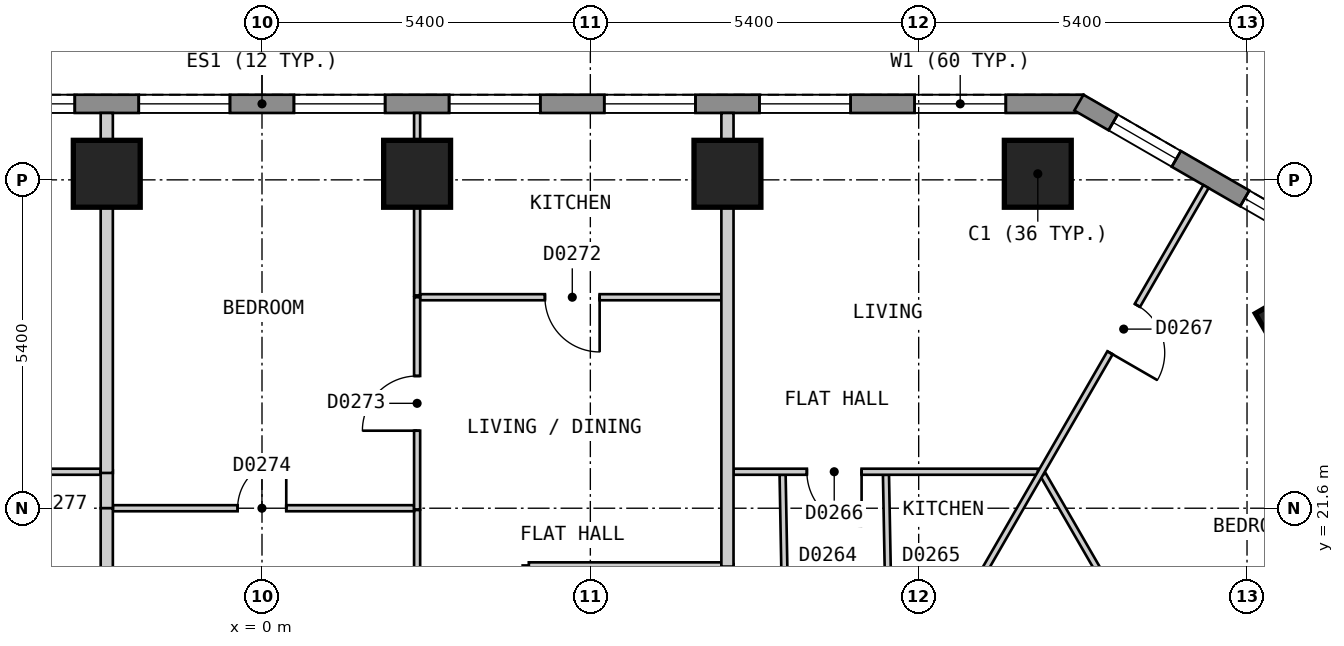
"""IFC4 building model, lengths in metres.
Left out: names, types, materials, properties, quantities, classifications, styles, units other than length and angle.
Written with IfcOpenShell. Run it as: python <this file> out.ifc"""

import sys

from ifc_helpers import new_model, si_unit, direction, frame, frame_2d, origin, origin_2d, place, context, subcontext, project, spatial, polyline, rectangle, outline, extrude, element, fill, save


model = new_model("IFC4")
c1 = context("Model", 3, precision=1e-05, world=origin(), true_north=direction((0.0, 1.0)))
c2 = subcontext(c1, "Body", "Model", "MODEL_VIEW")
j1 = project(units=[si_unit("LENGTHUNIT", "METRE"), si_unit("PLANEANGLEUNIT", "RADIAN")], contexts=[c1])
p1 = place(None, origin())
s1 = spatial("IfcSite", under=j1, at=p1, CompositionType="ELEMENT")
p2 = place(p1, origin())
s2 = spatial("IfcBuilding", under=s1, at=p2, CompositionType="ELEMENT")
p3 = place(p2, frame((0.0, 0.0, 41.4)))
s3 = spatial("IfcBuildingStorey", under=s2, at=p3, CompositionType="ELEMENT", Elevation=41.4)
for number, where, z_axis, x_axis in (
    (1, (12.759, 27.1, 0.0), (0.0, 0.0, 1.0), (-1.0, 0.0, 0.0)),
    (2, (7.655, 27.1, 0.0), (0.0, 0.0, 1.0), (-1.0, 0.0, 0.0)),
    (3, (2.551, 27.1, 0.0), (0.0, 0.0, 1.0), (-1.0, 0.0, 0.0)),
    (4, (-2.553, 27.1, 0.0), (0.0, 0.0, 1.0), (-1.0, 0.0, 0.0)),
    (5, (17.089, 24.601, 0.0), (0.0, 0.0, 1.0), (-0.5, 0.866, 0.0)),
):
    element("IfcColumn", number, at=place(p3, frame(where, z_axis=z_axis, x_axis=x_axis)), inside=s3, PredefinedType="COLUMN", context=c2, shape_type="SweptSolid", body=[
        extrude(rectangle(XDim=1.1, YDim=1.1, at=origin_2d()), origin(), (0.0, 0.0, 1.0), 3.0),
    ])
p4 = place(p3, frame((13.51, 28.25, 0.0), z_axis=(0.0, 0.0, 1.0), x_axis=(-1.0, 0.0, 0.0)))
e6 = element("IfcWall", 6, at=p4, inside=s3, PredefinedType="SOLIDWALL", context=c2, shape_type="SweptSolid", body=[
    extrude(outline(polyline([(0.0, -0.15), (27.02, -0.15), (26.94, 0.15), (0.08, 0.15), (0.0, -0.15)])), origin(), (0.0, 0.0, 1.0), 2.7),
])
p5 = place(p4, frame((1.277, 0.0, 0.15)))
e7 = element("IfcOpeningElement", 7, at=p5, cuts=e6, PredefinedType="OPENING", context=c2, shape_type="SweptSolid", body=[
    extrude(rectangle(XDim=1.5, YDim=2.1, at=frame_2d((0.75, 1.05))), frame((0.0, 0.16, 0.0), z_axis=(0.0, -1.0, 0.0), x_axis=(1.0, 0.0, 0.0)), (0.0, 0.0, 1.0), 0.32),
])
p6 = place(p4, frame((3.829, 0.0, 0.15)))
e8 = element("IfcOpeningElement", 8, at=p6, cuts=e6, PredefinedType="OPENING", context=c2, shape_type="SweptSolid", body=[
    extrude(rectangle(XDim=1.5, YDim=2.1, at=frame_2d((0.75, 1.05))), frame((0.0, 0.16, 0.0), z_axis=(0.0, -1.0, 0.0), x_axis=(1.0, 0.0, 0.0)), (0.0, 0.0, 1.0), 0.32),
])
p7 = place(p4, frame((6.381, 0.0, 0.15)))
e9 = element("IfcOpeningElement", 9, at=p7, cuts=e6, PredefinedType="OPENING", context=c2, shape_type="SweptSolid", body=[
    extrude(rectangle(XDim=1.5, YDim=2.1, at=frame_2d((0.75, 1.05))), frame((0.0, 0.16, 0.0), z_axis=(0.0, -1.0, 0.0), x_axis=(1.0, 0.0, 0.0)), (0.0, 0.0, 1.0), 0.32),
])
p8 = place(p4, frame((8.933, 0.0, 0.15)))
e10 = element("IfcOpeningElement", 10, at=p8, cuts=e6, PredefinedType="OPENING", context=c2, shape_type="SweptSolid", body=[
    extrude(rectangle(XDim=1.5, YDim=2.1, at=frame_2d((0.75, 1.05))), frame((0.0, 0.16, 0.0), z_axis=(0.0, -1.0, 0.0), x_axis=(1.0, 0.0, 0.0)), (0.0, 0.0, 1.0), 0.32),
])
p9 = place(p4, frame((11.485, 0.0, 0.15)))
e11 = element("IfcOpeningElement", 11, at=p9, cuts=e6, PredefinedType="OPENING", context=c2, shape_type="SweptSolid", body=[
    extrude(rectangle(XDim=1.5, YDim=2.1, at=frame_2d((0.75, 1.05))), frame((0.0, 0.16, 0.0), z_axis=(0.0, -1.0, 0.0), x_axis=(1.0, 0.0, 0.0)), (0.0, 0.0, 1.0), 0.32),
])
p10 = place(p4, frame((14.037, 0.0, 0.15)))
e12 = element("IfcOpeningElement", 12, at=p10, cuts=e6, PredefinedType="OPENING", context=c2, shape_type="SweptSolid", body=[
    extrude(rectangle(XDim=1.5, YDim=2.1, at=frame_2d((0.75, 1.05))), frame((0.0, 0.16, 0.0), z_axis=(0.0, -1.0, 0.0), x_axis=(1.0, 0.0, 0.0)), (0.0, 0.0, 1.0), 0.32),
])
p11 = place(p4, frame((16.589, 0.0, 0.15)))
e13 = element("IfcOpeningElement", 13, at=p11, cuts=e6, PredefinedType="OPENING", context=c2, shape_type="SweptSolid", body=[
    extrude(rectangle(XDim=1.5, YDim=2.1, at=frame_2d((0.75, 1.05))), frame((0.0, 0.16, 0.0), z_axis=(0.0, -1.0, 0.0), x_axis=(1.0, 0.0, 0.0)), (0.0, 0.0, 1.0), 0.32),
])
p12 = place(p4, frame((19.141, 0.0, 0.15)))
e14 = element("IfcOpeningElement", 14, at=p12, cuts=e6, PredefinedType="OPENING", context=c2, shape_type="SweptSolid", body=[
    extrude(rectangle(XDim=1.5, YDim=2.1, at=frame_2d((0.75, 1.05))), frame((0.0, 0.16, 0.0), z_axis=(0.0, -1.0, 0.0), x_axis=(1.0, 0.0, 0.0)), (0.0, 0.0, 1.0), 0.32),
])
p13 = place(p4, frame((21.693, 0.0, 0.15)))
e15 = element("IfcOpeningElement", 15, at=p13, cuts=e6, PredefinedType="OPENING", context=c2, shape_type="SweptSolid", body=[
    extrude(rectangle(XDim=1.5, YDim=2.1, at=frame_2d((0.75, 1.05))), frame((0.0, 0.16, 0.0), z_axis=(0.0, -1.0, 0.0), x_axis=(1.0, 0.0, 0.0)), (0.0, 0.0, 1.0), 0.32),
])
p14 = place(p4, frame((24.245, 0.0, 0.15)))
e16 = element("IfcOpeningElement", 16, at=p14, cuts=e6, PredefinedType="OPENING", context=c2, shape_type="SweptSolid", body=[
    extrude(rectangle(XDim=1.5, YDim=2.1, at=frame_2d((0.75, 1.05))), frame((0.0, 0.16, 0.0), z_axis=(0.0, -1.0, 0.0), x_axis=(1.0, 0.0, 0.0)), (0.0, 0.0, 1.0), 0.32),
])
p15 = place(p3, frame((17.765, 25.77, 0.0), z_axis=(0.0, 0.0, 1.0), x_axis=(-0.866010750942, 0.50002537861, 0.0)))
e17 = element("IfcWall", 17, at=p15, inside=s3, PredefinedType="SOLIDWALL", context=c2, shape_type="SweptSolid", body=[
    extrude(outline(polyline([(0.0, -0.15), (5.0, -0.15), (4.919, 0.15), (0.08, 0.15), (0.0, -0.15)])), origin(), (0.0, 0.0, 1.0), 2.7),
])
p16 = place(p15, frame((0.65, 0.0, 0.15)))
e18 = element("IfcOpeningElement", 18, at=p16, cuts=e17, PredefinedType="OPENING", context=c2, shape_type="SweptSolid", body=[
    extrude(rectangle(XDim=1.2, YDim=2.1, at=frame_2d((0.6, 1.05))), frame((0.0, 0.16, 0.0), z_axis=(0.0, -1.0, 0.0), x_axis=(1.0, 0.0, 0.0)), (0.0, 0.0, 1.0), 0.32),
])
p17 = place(p15, frame((3.15, 0.0, 0.15)))
e19 = element("IfcOpeningElement", 19, at=p17, cuts=e17, PredefinedType="OPENING", context=c2, shape_type="SweptSolid", body=[
    extrude(rectangle(XDim=1.2, YDim=2.1, at=frame_2d((0.6, 1.05))), frame((0.0, 0.16, 0.0), z_axis=(0.0, -1.0, 0.0), x_axis=(1.0, 0.0, 0.0)), (0.0, 0.0, 1.0), 0.32),
])
p18 = place(p3, frame((12.846, 22.15, 0.0), z_axis=(0.0, 0.0, 1.0), x_axis=(0.500002715276, -0.866023836113, 0.0)))
e20 = element("IfcWall", 20, at=p18, inside=s3, PredefinedType="PARTITIONING", context=c2, shape_type="SweptSolid", body=[
    extrude(rectangle(XDim=5.002, YDim=0.1, at=frame_2d((2.501, 0.0))), origin(), (0.0, 0.0, 1.0), 2.7),
])
p19 = place(p18, frame((2.122, 0.0, 0.0)))
e21 = element("IfcOpeningElement", 21, at=p19, cuts=e20, PredefinedType="OPENING", context=c2, shape_type="SweptSolid", body=[
    extrude(rectangle(XDim=0.8, YDim=2.1, at=frame_2d((0.4, 1.05))), frame((0.0, 0.06, 0.0), z_axis=(0.0, -1.0, 0.0), x_axis=(1.0, 0.0, 0.0)), (0.0, 0.0, 1.0), 0.12),
])
p20 = place(p3, frame((8.562, 22.15, 0.0), z_axis=(0.0, 0.0, 1.0), x_axis=(0.018504185939, -0.999828782894, 0.0)))
e22 = element("IfcWall", 22, at=p20, inside=s3, PredefinedType="PARTITIONING", context=c2, shape_type="SweptSolid", body=[
    extrude(rectangle(XDim=4.051, YDim=0.1, at=frame_2d((2.025, 0.0))), origin(), (0.0, 0.0, 1.0), 2.7),
])
p21 = place(p20, frame((1.65, 0.0, 0.0)))
e23 = element("IfcOpeningElement", 23, at=p21, cuts=e22, PredefinedType="OPENING", context=c2, shape_type="SweptSolid", body=[
    extrude(rectangle(XDim=0.8, YDim=2.1, at=frame_2d((0.4, 1.05))), frame((0.0, 0.06, 0.0), z_axis=(0.0, -1.0, 0.0), x_axis=(1.0, 0.0, 0.0)), (0.0, 0.0, 1.0), 0.12),
])
p22 = place(p3, frame((10.262, 22.15, 0.0), z_axis=(0.0, 0.0, 1.0), x_axis=(0.018730524712, -0.999824568334, 0.0)))
e24 = element("IfcWall", 24, at=p22, inside=s3, PredefinedType="PARTITIONING", context=c2, shape_type="SweptSolid", body=[
    extrude(rectangle(XDim=4.054, YDim=0.1, at=frame_2d((2.027, 0.0))), origin(), (0.0, 0.0, 1.0), 2.7),
])
p23 = place(p22, frame((1.6, 0.0, 0.0)))
e25 = element("IfcOpeningElement", 25, at=p23, cuts=e24, PredefinedType="OPENING", context=c2, shape_type="SweptSolid", body=[
    extrude(rectangle(XDim=0.9, YDim=2.1, at=frame_2d((0.45, 1.05))), frame((0.0, 0.06, 0.0), z_axis=(0.0, -1.0, 0.0), x_axis=(1.0, 0.0, 0.0)), (0.0, 0.0, 1.0), 0.12),
])
p24 = place(p3, frame((2.551, 28.1, 0.0), z_axis=(0.0, 0.0, 1.0), x_axis=(0.0, -1.0, 0.0)))
e26 = element("IfcWall", 26, at=p24, inside=s3, PredefinedType="PARTITIONING", context=c2, shape_type="SweptSolid", body=[
    extrude(rectangle(XDim=3.0, YDim=0.1, at=frame_2d((1.5, 0.0))), origin(), (0.0, 0.0, 1.0), 2.7),
])
p25 = place(p3, frame((2.551, 21.57, 0.0), z_axis=(0.0, 0.0, 1.0), x_axis=(0.0, -1.0, 0.0)))
e27 = element("IfcWall", 27, at=p25, inside=s3, PredefinedType="PARTITIONING", context=c2, shape_type="SweptSolid", body=[
    extrude(rectangle(XDim=3.47, YDim=0.1, at=frame_2d((1.735, 0.0))), origin(), (0.0, 0.0, 1.0), 2.7),
])
p26 = place(p3, frame((4.388, 20.66, 0.0), z_axis=(0.0, 0.0, 1.0), x_axis=(1.0, 0.0, 0.0)))
e28 = element("IfcWall", 28, at=p26, inside=s3, PredefinedType="PARTITIONING", context=c2, shape_type="SweptSolid", body=[
    extrude(rectangle(XDim=3.167, YDim=0.1, at=frame_2d((1.583, 0.0))), origin(), (0.0, 0.0, 1.0), 2.7),
])
p27 = place(p3, frame((-2.453, 21.6, 0.0), z_axis=(0.0, 0.0, 1.0), x_axis=(1.0, 0.0, 0.0)))
e29 = element("IfcWall", 29, at=p27, inside=s3, PredefinedType="PARTITIONING", context=c2, shape_type="SweptSolid", body=[
    extrude(rectangle(XDim=4.954, YDim=0.1, at=frame_2d((2.477, 0.0))), origin(), (0.0, 0.0, 1.0), 2.7),
])
p28 = place(p27, frame((2.052, 0.0, 0.0)))
e30 = element("IfcOpeningElement", 30, at=p28, cuts=e29, PredefinedType="OPENING", context=c2, shape_type="SweptSolid", body=[
    extrude(rectangle(XDim=0.8, YDim=2.1, at=frame_2d((0.4, 1.05))), frame((0.0, 0.06, 0.0), z_axis=(0.0, -1.0, 0.0), x_axis=(1.0, 0.0, 0.0)), (0.0, 0.0, 1.0), 0.12),
])
p29 = place(p3, frame((-12.711, 22.2, 0.0), z_axis=(0.0, 0.0, 1.0), x_axis=(1.0, 0.0, 0.0)))
e31 = element("IfcWall", 31, at=p29, inside=s3, PredefinedType="PARTITIONING", context=c2, shape_type="SweptSolid", body=[
    extrude(rectangle(XDim=10.058, YDim=0.1, at=frame_2d((5.029, 0.0))), origin(), (0.0, 0.0, 1.0), 2.7),
])
p30 = place(p29, frame((7.156, 0.0, 0.0)))
e32 = element("IfcOpeningElement", 32, at=p30, cuts=e31, PredefinedType="OPENING", context=c2, shape_type="SweptSolid", body=[
    extrude(rectangle(XDim=0.9, YDim=2.1, at=frame_2d((0.45, 1.05))), frame((0.0, 0.06, 0.0), z_axis=(0.0, -1.0, 0.0), x_axis=(1.0, 0.0, 0.0)), (0.0, 0.0, 1.0), 0.12),
])
p31 = place(p29, frame((2.102, 0.0, 0.0)))
e33 = element("IfcOpeningElement", 33, at=p31, cuts=e31, PredefinedType="OPENING", context=c2, shape_type="SweptSolid", body=[
    extrude(rectangle(XDim=0.8, YDim=2.1, at=frame_2d((0.4, 1.05))), frame((0.0, 0.06, 0.0), z_axis=(0.0, -1.0, 0.0), x_axis=(1.0, 0.0, 0.0)), (0.0, 0.0, 1.0), 0.12),
])
p32 = place(p3, frame((7.755, 22.2, 0.0), z_axis=(0.0, 0.0, 1.0), x_axis=(1.0, 0.0, 0.0)))
e34 = element("IfcWall", 34, at=p32, inside=s3, PredefinedType="PARTITIONING", context=c2, shape_type="SweptSolid", body=[
    extrude(rectangle(XDim=5.005, YDim=0.1, at=frame_2d((2.502, 0.0))), origin(), (0.0, 0.0, 1.0), 2.7),
])
p33 = place(p32, frame((1.206, 0.0, 0.0)))
e35 = element("IfcOpeningElement", 35, at=p33, cuts=e34, PredefinedType="OPENING", context=c2, shape_type="SweptSolid", body=[
    extrude(rectangle(XDim=0.9, YDim=2.1, at=frame_2d((0.45, 1.05))), frame((0.0, 0.06, 0.0), z_axis=(0.0, -1.0, 0.0), x_axis=(1.0, 0.0, 0.0)), (0.0, 0.0, 1.0), 0.12),
])
p34 = place(p3, frame((2.601, 25.07, 0.0), z_axis=(0.0, 0.0, 1.0), x_axis=(1.0, 0.0, 0.0)))
e36 = element("IfcWall", 36, at=p34, inside=s3, PredefinedType="PARTITIONING", context=c2, shape_type="SweptSolid", body=[
    extrude(rectangle(XDim=4.954, YDim=0.1, at=frame_2d((2.477, 0.0))), origin(), (0.0, 0.0, 1.0), 2.7),
])
p35 = place(p34, frame((2.052, 0.0, 0.0)))
e37 = element("IfcOpeningElement", 37, at=p35, cuts=e36, PredefinedType="OPENING", context=c2, shape_type="SweptSolid", body=[
    extrude(rectangle(XDim=0.9, YDim=2.1, at=frame_2d((0.45, 1.05))), frame((0.0, 0.06, 0.0), z_axis=(0.0, -1.0, 0.0), x_axis=(1.0, 0.0, 0.0)), (0.0, 0.0, 1.0), 0.12),
])
p36 = place(p3, frame((10.393, 18.0, 0.0), z_axis=(0.0, 0.0, 1.0), x_axis=(0.499945497007, 0.866056868816, 0.0)))
e38 = element("IfcWall", 38, at=p36, inside=s3, PredefinedType="PARTITIONING", context=c2, shape_type="SweptSolid", body=[
    extrude(rectangle(XDim=10.265, YDim=0.1, at=frame_2d((5.132, 0.0))), origin(), (0.0, 0.0, 1.0), 2.7),
])
p37 = place(p36, frame((7.108, 0.0, 0.0)))
e39 = element("IfcOpeningElement", 39, at=p37, cuts=e38, PredefinedType="OPENING", context=c2, shape_type="SweptSolid", body=[
    extrude(rectangle(XDim=0.9, YDim=2.1, at=frame_2d((0.45, 1.05))), frame((0.0, 0.06, 0.0), z_axis=(0.0, -1.0, 0.0), x_axis=(1.0, 0.0, 0.0)), (0.0, 0.0, 1.0), 0.12),
])
p38 = place(p3, frame((4.337, 18.1, 0.0), z_axis=(0.0, 0.0, 1.0), x_axis=(0.0, 1.0, 0.0)))
e40 = element("IfcWall", 40, at=p38, inside=s3, PredefinedType="PARTITIONING", context=c2, shape_type="SweptSolid", body=[
    extrude(rectangle(XDim=2.559, YDim=0.1, at=frame_2d((1.279, 0.0))), origin(), (0.0, 0.0, 1.0), 2.7),
])
p39 = place(p38, frame((0.78, 0.0, 0.0)))
e41 = element("IfcOpeningElement", 41, at=p39, cuts=e40, PredefinedType="OPENING", context=c2, shape_type="SweptSolid", body=[
    extrude(rectangle(XDim=0.9, YDim=2.1, at=frame_2d((0.45, 1.05))), frame((0.0, 0.06, 0.0), z_axis=(0.0, -1.0, 0.0), x_axis=(1.0, 0.0, 0.0)), (0.0, 0.0, 1.0), 0.12),
])
p40 = place(p3, frame((2.551, 21.58, 0.0), z_axis=(0.0, 0.0, 1.0), x_axis=(0.0, 1.0, 0.0)))
e42 = element("IfcWall", 42, at=p40, inside=s3, PredefinedType="PARTITIONING", context=c2, shape_type="SweptSolid", body=[
    extrude(rectangle(XDim=3.49, YDim=0.1, at=frame_2d((1.745, 0.0))), origin(), (0.0, 0.0, 1.0), 2.7),
])
p41 = place(p40, frame((1.295, 0.0, 0.0)))
e43 = element("IfcOpeningElement", 43, at=p41, cuts=e42, PredefinedType="OPENING", context=c2, shape_type="SweptSolid", body=[
    extrude(rectangle(XDim=0.9, YDim=2.1, at=frame_2d((0.45, 1.05))), frame((0.0, 0.06, 0.0), z_axis=(0.0, -1.0, 0.0), x_axis=(1.0, 0.0, 0.0)), (0.0, 0.0, 1.0), 0.12),
])
p42 = place(p3, frame((-2.553, 22.22, 0.0), z_axis=(0.0, 0.0, 1.0), x_axis=(0.0, -1.0, 0.0)))
e44 = element("IfcWall", 44, at=p42, inside=s3, PredefinedType="PARTITIONING", context=c2, shape_type="SweptSolid", body=[
    extrude(rectangle(XDim=0.62, YDim=0.2, at=frame_2d((0.31, 0.0))), origin(), (0.0, 0.0, 1.0), 2.7),
])
p43 = place(p3, frame((7.655, 20.68, 0.0), z_axis=(0.0, 0.0, 1.0), x_axis=(0.0, -1.0, 0.0)))
e45 = element("IfcWall", 45, at=p43, inside=s3, PredefinedType="PARTITIONING", context=c2, shape_type="SweptSolid", body=[
    extrude(rectangle(XDim=2.58, YDim=0.2, at=frame_2d((1.29, 0.0))), origin(), (0.0, 0.0, 1.0), 2.7),
])
p44 = place(p3, frame((7.655, 20.64, 0.0), z_axis=(0.0, 0.0, 1.0), x_axis=(0.0, 1.0, 0.0)))
e46 = element("IfcWall", 46, at=p44, inside=s3, PredefinedType="PARTITIONING", context=c2, shape_type="SweptSolid", body=[
    extrude(rectangle(XDim=7.46, YDim=0.2, at=frame_2d((3.73, 0.0))), origin(), (0.0, 0.0, 1.0), 2.7),
])
p45 = place(p3, frame((-2.553, 18.1, 0.0), z_axis=(0.0, 0.0, 1.0), x_axis=(0.0, 1.0, 0.0)))
e47 = element("IfcWall", 47, at=p45, inside=s3, PredefinedType="PARTITIONING", context=c2, shape_type="SweptSolid", body=[
    extrude(rectangle(XDim=3.5, YDim=0.2, at=frame_2d((1.75, 0.0))), origin(), (0.0, 0.0, 1.0), 2.7),
])
p46 = place(p3, frame((-2.553, 22.18, 0.0), z_axis=(0.0, 0.0, 1.0), x_axis=(0.0, 1.0, 0.0)))
e48 = element("IfcWall", 48, at=p46, inside=s3, PredefinedType="PARTITIONING", context=c2, shape_type="SweptSolid", body=[
    extrude(rectangle(XDim=5.92, YDim=0.2, at=frame_2d((2.96, 0.0))), origin(), (0.0, 0.0, 1.0), 2.7),
])
p47 = place(p3, frame((11.847, 15.681, 0.0), z_axis=(0.0, 0.0, 1.0), x_axis=(0.866022959057, 0.500004234368, 0.0)))
e49 = element("IfcWall", 49, at=p47, inside=s3, PredefinedType="PARTITIONING", context=c2, shape_type="SweptSolid", body=[
    extrude(rectangle(XDim=10.0, YDim=0.2, at=frame_2d((5.0, 0.0))), origin(), (0.0, 0.0, 1.0), 2.7),
])
p48 = place(p5, origin())
e50 = element("IfcWindow", 50, at=p48, inside=s3, PartitioningType="SINGLE_PANEL", PredefinedType="WINDOW", context=c2, shape_type="SweptSolid", body=[
    extrude(rectangle(XDim=1.5, YDim=2.1, at=frame_2d((0.75, 1.05))), frame((0.0, 0.03, 0.0), z_axis=(0.0, -1.0, 0.0), x_axis=(1.0, 0.0, 0.0)), (0.0, 0.0, 1.0), 0.06),
])
fill(e7, e50)
p49 = place(p6, origin())
e51 = element("IfcWindow", 51, at=p49, inside=s3, PartitioningType="SINGLE_PANEL", PredefinedType="WINDOW", context=c2, shape_type="SweptSolid", body=[
    extrude(rectangle(XDim=1.5, YDim=2.1, at=frame_2d((0.75, 1.05))), frame((0.0, 0.03, 0.0), z_axis=(0.0, -1.0, 0.0), x_axis=(1.0, 0.0, 0.0)), (0.0, 0.0, 1.0), 0.06),
])
fill(e8, e51)
p50 = place(p7, origin())
e52 = element("IfcWindow", 52, at=p50, inside=s3, PartitioningType="SINGLE_PANEL", PredefinedType="WINDOW", context=c2, shape_type="SweptSolid", body=[
    extrude(rectangle(XDim=1.5, YDim=2.1, at=frame_2d((0.75, 1.05))), frame((0.0, 0.03, 0.0), z_axis=(0.0, -1.0, 0.0), x_axis=(1.0, 0.0, 0.0)), (0.0, 0.0, 1.0), 0.06),
])
fill(e9, e52)
p51 = place(p8, origin())
e53 = element("IfcWindow", 53, at=p51, inside=s3, PartitioningType="SINGLE_PANEL", PredefinedType="WINDOW", context=c2, shape_type="SweptSolid", body=[
    extrude(rectangle(XDim=1.5, YDim=2.1, at=frame_2d((0.75, 1.05))), frame((0.0, 0.03, 0.0), z_axis=(0.0, -1.0, 0.0), x_axis=(1.0, 0.0, 0.0)), (0.0, 0.0, 1.0), 0.06),
])
fill(e10, e53)
p52 = place(p9, origin())
e54 = element("IfcWindow", 54, at=p52, inside=s3, PartitioningType="SINGLE_PANEL", PredefinedType="WINDOW", context=c2, shape_type="SweptSolid", body=[
    extrude(rectangle(XDim=1.5, YDim=2.1, at=frame_2d((0.75, 1.05))), frame((0.0, 0.03, 0.0), z_axis=(0.0, -1.0, 0.0), x_axis=(1.0, 0.0, 0.0)), (0.0, 0.0, 1.0), 0.06),
])
fill(e11, e54)
p53 = place(p10, origin())
e55 = element("IfcWindow", 55, at=p53, inside=s3, PartitioningType="SINGLE_PANEL", PredefinedType="WINDOW", context=c2, shape_type="SweptSolid", body=[
    extrude(rectangle(XDim=1.5, YDim=2.1, at=frame_2d((0.75, 1.05))), frame((0.0, 0.03, 0.0), z_axis=(0.0, -1.0, 0.0), x_axis=(1.0, 0.0, 0.0)), (0.0, 0.0, 1.0), 0.06),
])
fill(e12, e55)
p54 = place(p11, origin())
e56 = element("IfcWindow", 56, at=p54, inside=s3, PartitioningType="SINGLE_PANEL", PredefinedType="WINDOW", context=c2, shape_type="SweptSolid", body=[
    extrude(rectangle(XDim=1.5, YDim=2.1, at=frame_2d((0.75, 1.05))), frame((0.0, 0.03, 0.0), z_axis=(0.0, -1.0, 0.0), x_axis=(1.0, 0.0, 0.0)), (0.0, 0.0, 1.0), 0.06),
])
fill(e13, e56)
p55 = place(p16, origin())
e57 = element("IfcWindow", 57, at=p55, inside=s3, PartitioningType="SINGLE_PANEL", PredefinedType="WINDOW", context=c2, shape_type="SweptSolid", body=[
    extrude(rectangle(XDim=1.2, YDim=2.1, at=frame_2d((0.6, 1.05))), frame((0.0, 0.03, 0.0), z_axis=(0.0, -1.0, 0.0), x_axis=(1.0, 0.0, 0.0)), (0.0, 0.0, 1.0), 0.06),
])
fill(e18, e57)
p56 = place(p17, origin())
e58 = element("IfcWindow", 58, at=p56, inside=s3, PartitioningType="SINGLE_PANEL", PredefinedType="WINDOW", context=c2, shape_type="SweptSolid", body=[
    extrude(rectangle(XDim=1.2, YDim=2.1, at=frame_2d((0.6, 1.05))), frame((0.0, 0.03, 0.0), z_axis=(0.0, -1.0, 0.0), x_axis=(1.0, 0.0, 0.0)), (0.0, 0.0, 1.0), 0.06),
])
fill(e19, e58)
p57 = place(p33, origin())
e59 = element("IfcDoor", 59, at=p57, inside=s3, OperationType="SINGLE_SWING_RIGHT", PredefinedType="DOOR", context=c2, shape_type="SweptSolid", body=[
    extrude(rectangle(XDim=0.9, YDim=2.1, at=frame_2d((0.45, 1.05))), frame((0.0, 0.025, 0.0), z_axis=(0.0, -1.0, 0.0), x_axis=(1.0, 0.0, 0.0)), (0.0, 0.0, 1.0), 0.05),
])
fill(e35, e59)
p58 = place(p37, origin())
e60 = element("IfcDoor", 60, at=p58, inside=s3, OperationType="SINGLE_SWING_LEFT", PredefinedType="DOOR", context=c2, shape_type="SweptSolid", body=[
    extrude(rectangle(XDim=0.9, YDim=2.1, at=frame_2d((0.45, 1.05))), frame((0.0, 0.025, 0.0), z_axis=(0.0, -1.0, 0.0), x_axis=(1.0, 0.0, 0.0)), (0.0, 0.0, 1.0), 0.05),
])
fill(e39, e60)
p59 = place(p35, origin())
e61 = element("IfcDoor", 61, at=p59, inside=s3, OperationType="SINGLE_SWING_RIGHT", PredefinedType="DOOR", context=c2, shape_type="SweptSolid", body=[
    extrude(rectangle(XDim=0.9, YDim=2.1, at=frame_2d((0.45, 1.05))), frame((0.0, 0.025, 0.0), z_axis=(0.0, -1.0, 0.0), x_axis=(1.0, 0.0, 0.0)), (0.0, 0.0, 1.0), 0.05),
])
fill(e37, e61)
p60 = place(p41, origin())
e62 = element("IfcDoor", 62, at=p60, inside=s3, OperationType="SINGLE_SWING_LEFT", PredefinedType="DOOR", context=c2, shape_type="SweptSolid", body=[
    extrude(rectangle(XDim=0.9, YDim=2.1, at=frame_2d((0.45, 1.05))), frame((0.0, 0.025, 0.0), z_axis=(0.0, -1.0, 0.0), x_axis=(1.0, 0.0, 0.0)), (0.0, 0.0, 1.0), 0.05),
])
fill(e43, e62)
p61 = place(p28, origin())
e63 = element("IfcDoor", 63, at=p61, inside=s3, OperationType="SINGLE_SWING_RIGHT", PredefinedType="DOOR", context=c2, shape_type="SweptSolid", body=[
    extrude(rectangle(XDim=0.8, YDim=2.1, at=frame_2d((0.4, 1.05))), frame((0.0, 0.025, 0.0), z_axis=(0.0, -1.0, 0.0), x_axis=(1.0, 0.0, 0.0)), (0.0, 0.0, 1.0), 0.05),
])
fill(e30, e63)
save(model, sys.argv[1])
